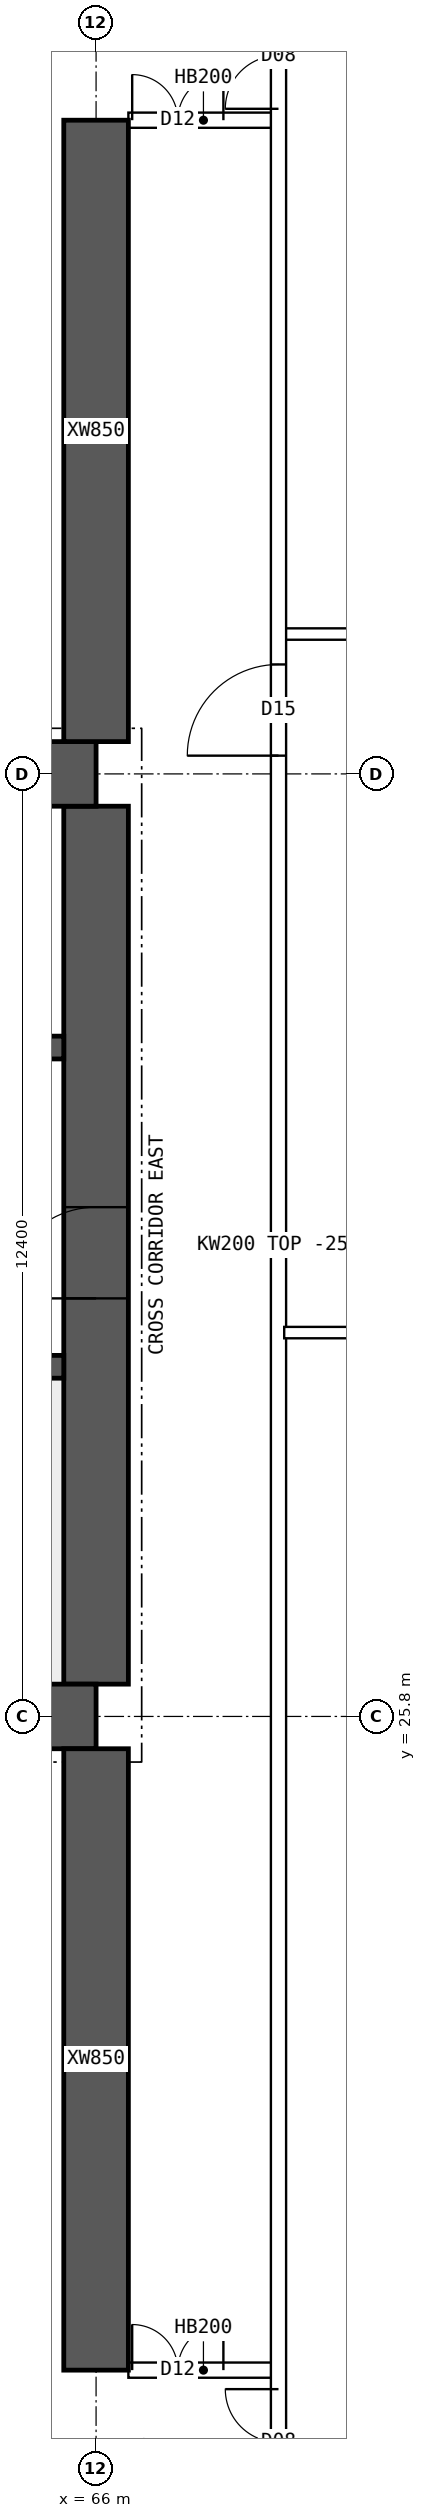
"""IFC4 building model, lengths in metres.
Left out: names, types, materials, properties, quantities, classifications, styles, units other than length and angle.
Written with IfcOpenShell. Run it as: python <this file> out.ifc"""

import sys

from ifc_helpers import new_model, si_unit, direction, frame, frame_2d, origin, place, context, subcontext, project, spatial, polyline, rectangle, outline, extrude, element, fill, save


model = new_model("IFC4")
c1 = context("Model", 3, precision=1e-05, world=origin(), true_north=direction((0.0, 1.0)))
c2 = subcontext(c1, "Body", "Model", "MODEL_VIEW")
j1 = project(units=[si_unit("LENGTHUNIT", "METRE"), si_unit("PLANEANGLEUNIT", "RADIAN")], contexts=[c1])
p1 = place(None, origin())
s1 = spatial("IfcSite", under=j1, at=p1, CompositionType="ELEMENT")
p2 = place(p1, origin())
s2 = spatial("IfcBuilding", under=s1, at=p2, CompositionType="ELEMENT")
p3 = place(p2, frame((0.0, 0.0, 152.35)))
s3 = spatial("IfcBuildingStorey", under=s2, at=p3, CompositionType="ELEMENT", Elevation=152.35)
for number, where, z_axis, x_axis in (
    (1, (18.0, 25.8, 0.0), (0.0, 0.0, 1.0), (1.0, 0.0, 0.0)),
    (2, (18.0, 38.2, 0.0), (0.0, 0.0, 1.0), (1.0, 0.0, 0.0)),
):
    element("IfcWall", number, at=place(p3, frame(where, z_axis=z_axis, x_axis=x_axis)), inside=s3, PredefinedType="SHEAR", context=c2, shape_type="SweptSolid", body=[
        extrude(rectangle(XDim=48.0, YDim=0.85, at=frame_2d((24.0, 0.0))), origin(), (0.0, 0.0, 1.0), 3.75),
    ])
p4 = place(p3, frame((66.0, 26.225, 0.0), z_axis=(0.0, 0.0, 1.0), x_axis=(0.0, 1.0, 0.0)))
e3 = element("IfcWall", 3, at=p4, inside=s3, PredefinedType="SHEAR", context=c2, shape_type="SweptSolid", body=[
    extrude(rectangle(XDim=11.55, YDim=0.85, at=frame_2d((5.775, 0.0))), origin(), (0.0, 0.0, 1.0), 3.75),
])
p5 = place(p4, frame((5.075, 0.0, 0.0)))
e4 = element("IfcOpeningElement", 4, at=p5, cuts=e3, PredefinedType="OPENING", context=c2, shape_type="SweptSolid", body=[
    extrude(rectangle(XDim=1.2, YDim=2.1, at=frame_2d((0.6, 1.05))), frame((0.0, 0.435, 0.0), z_axis=(0.0, -1.0, 0.0), x_axis=(1.0, 0.0, 0.0)), (0.0, 0.0, 1.0), 0.87),
])
p6 = place(p3, frame((18.425, 30.4, 0.0), z_axis=(0.0, 0.0, 1.0), x_axis=(1.0, 0.0, 0.0)))
e5 = element("IfcWall", 5, at=p6, inside=s3, PredefinedType="SHEAR", context=c2, shape_type="SweptSolid", body=[
    extrude(rectangle(XDim=47.15, YDim=0.3, at=frame_2d((23.575, 0.0))), origin(), (0.0, 0.0, 1.0), 3.75),
])
p7 = place(p6, frame((0.4, 0.0, 0.0)))
e6 = element("IfcOpeningElement", 6, at=p7, cuts=e5, PredefinedType="OPENING", context=c2, shape_type="SweptSolid", body=[
    extrude(rectangle(XDim=1.0, YDim=2.1, at=frame_2d((0.5, 1.05))), frame((0.0, 0.16, 0.0), z_axis=(0.0, -1.0, 0.0), x_axis=(1.0, 0.0, 0.0)), (0.0, 0.0, 1.0), 0.32),
])
p8 = place(p6, frame((45.75, 0.0, 0.0)))
e7 = element("IfcOpeningElement", 7, at=p8, cuts=e5, PredefinedType="OPENING", context=c2, shape_type="SweptSolid", body=[
    extrude(rectangle(XDim=1.0, YDim=2.1, at=frame_2d((0.5, 1.05))), frame((0.0, 0.16, 0.0), z_axis=(0.0, -1.0, 0.0), x_axis=(1.0, 0.0, 0.0)), (0.0, 0.0, 1.0), 0.32),
])
p9 = place(p6, frame((8.325, 0.0, 0.0)))
e8 = element("IfcOpeningElement", 8, at=p9, cuts=e5, PredefinedType="OPENING", context=c2, shape_type="SweptSolid", body=[
    extrude(rectangle(XDim=1.1, YDim=2.1, at=frame_2d((0.55, 1.05))), frame((0.0, 0.16, 0.0), z_axis=(0.0, -1.0, 0.0), x_axis=(1.0, 0.0, 0.0)), (0.0, 0.0, 1.0), 0.32),
])
p10 = place(p6, frame((10.925, 0.0, 0.0)))
e9 = element("IfcOpeningElement", 9, at=p10, cuts=e5, PredefinedType="OPENING", context=c2, shape_type="SweptSolid", body=[
    extrude(rectangle(XDim=1.1, YDim=2.1, at=frame_2d((0.55, 1.05))), frame((0.0, 0.16, 0.0), z_axis=(0.0, -1.0, 0.0), x_axis=(1.0, 0.0, 0.0)), (0.0, 0.0, 1.0), 0.32),
])
p11 = place(p6, frame((13.525, 0.0, 0.0)))
e10 = element("IfcOpeningElement", 10, at=p11, cuts=e5, PredefinedType="OPENING", context=c2, shape_type="SweptSolid", body=[
    extrude(rectangle(XDim=1.1, YDim=2.1, at=frame_2d((0.55, 1.05))), frame((0.0, 0.16, 0.0), z_axis=(0.0, -1.0, 0.0), x_axis=(1.0, 0.0, 0.0)), (0.0, 0.0, 1.0), 0.32),
])
p12 = place(p6, frame((16.125, 0.0, 0.0)))
e11 = element("IfcOpeningElement", 11, at=p12, cuts=e5, PredefinedType="OPENING", context=c2, shape_type="SweptSolid", body=[
    extrude(rectangle(XDim=1.1, YDim=2.1, at=frame_2d((0.55, 1.05))), frame((0.0, 0.16, 0.0), z_axis=(0.0, -1.0, 0.0), x_axis=(1.0, 0.0, 0.0)), (0.0, 0.0, 1.0), 0.32),
])
p13 = place(p6, frame((18.9, 0.0, 0.0)))
e12 = element("IfcOpeningElement", 12, at=p13, cuts=e5, PredefinedType="OPENING", context=c2, shape_type="SweptSolid", body=[
    extrude(rectangle(XDim=0.9, YDim=2.1, at=frame_2d((0.45, 1.05))), frame((0.0, 0.16, 0.0), z_axis=(0.0, -1.0, 0.0), x_axis=(1.0, 0.0, 0.0)), (0.0, 0.0, 1.0), 0.32),
])
p14 = place(p6, frame((30.192, 0.0, 0.0)))
e13 = element("IfcOpeningElement", 13, at=p14, cuts=e5, PredefinedType="OPENING", context=c2, shape_type="SweptSolid", body=[
    extrude(rectangle(XDim=1.1, YDim=2.1, at=frame_2d((0.55, 1.05))), frame((0.0, 0.16, 0.0), z_axis=(0.0, -1.0, 0.0), x_axis=(1.0, 0.0, 0.0)), (0.0, 0.0, 1.0), 0.32),
])
p15 = place(p6, frame((33.725, 0.0, 0.0)))
e14 = element("IfcOpeningElement", 14, at=p15, cuts=e5, PredefinedType="OPENING", context=c2, shape_type="SweptSolid", body=[
    extrude(rectangle(XDim=1.1, YDim=2.1, at=frame_2d((0.55, 1.05))), frame((0.0, 0.16, 0.0), z_axis=(0.0, -1.0, 0.0), x_axis=(1.0, 0.0, 0.0)), (0.0, 0.0, 1.0), 0.32),
])
p16 = place(p6, frame((37.258, 0.0, 0.0)))
e15 = element("IfcOpeningElement", 15, at=p16, cuts=e5, PredefinedType="OPENING", context=c2, shape_type="SweptSolid", body=[
    extrude(rectangle(XDim=1.1, YDim=2.1, at=frame_2d((0.55, 1.05))), frame((0.0, 0.16, 0.0), z_axis=(0.0, -1.0, 0.0), x_axis=(1.0, 0.0, 0.0)), (0.0, 0.0, 1.0), 0.32),
])
p17 = place(p3, frame((18.425, 34.6, 0.0), z_axis=(0.0, 0.0, 1.0), x_axis=(1.0, 0.0, 0.0)))
e16 = element("IfcWall", 16, at=p17, inside=s3, PredefinedType="SHEAR", context=c2, shape_type="SweptSolid", body=[
    extrude(rectangle(XDim=47.15, YDim=0.3, at=frame_2d((23.575, 0.0))), origin(), (0.0, 0.0, 1.0), 3.75),
])
p18 = place(p17, frame((0.9, 0.0, 0.0)))
e17 = element("IfcOpeningElement", 17, at=p18, cuts=e16, PredefinedType="OPENING", context=c2, shape_type="SweptSolid", body=[
    extrude(rectangle(XDim=1.1, YDim=2.1, at=frame_2d((0.55, 1.05))), frame((0.0, 0.16, 0.0), z_axis=(0.0, -1.0, 0.0), x_axis=(1.0, 0.0, 0.0)), (0.0, 0.0, 1.0), 0.32),
])
p19 = place(p17, frame((45.15, 0.0, 0.0)))
e18 = element("IfcOpeningElement", 18, at=p19, cuts=e16, PredefinedType="OPENING", context=c2, shape_type="SweptSolid", body=[
    extrude(rectangle(XDim=1.1, YDim=2.1, at=frame_2d((0.55, 1.05))), frame((0.0, 0.16, 0.0), z_axis=(0.0, -1.0, 0.0), x_axis=(1.0, 0.0, 0.0)), (0.0, 0.0, 1.0), 0.32),
])
p20 = place(p17, frame((4.175, 0.0, 0.0)))
e19 = element("IfcOpeningElement", 19, at=p20, cuts=e16, PredefinedType="OPENING", context=c2, shape_type="SweptSolid", body=[
    extrude(rectangle(XDim=0.9, YDim=2.1, at=frame_2d((0.45, 1.05))), frame((0.0, 0.16, 0.0), z_axis=(0.0, -1.0, 0.0), x_axis=(1.0, 0.0, 0.0)), (0.0, 0.0, 1.0), 0.32),
])
p21 = place(p17, frame((42.075, 0.0, 0.0)))
e20 = element("IfcOpeningElement", 20, at=p21, cuts=e16, PredefinedType="OPENING", context=c2, shape_type="SweptSolid", body=[
    extrude(rectangle(XDim=0.9, YDim=2.1, at=frame_2d((0.45, 1.05))), frame((0.0, 0.16, 0.0), z_axis=(0.0, -1.0, 0.0), x_axis=(1.0, 0.0, 0.0)), (0.0, 0.0, 1.0), 0.32),
])
p22 = place(p17, frame((8.95, 0.0, 0.0)))
e21 = element("IfcOpeningElement", 21, at=p22, cuts=e16, PredefinedType="OPENING", context=c2, shape_type="SweptSolid", body=[
    extrude(rectangle(XDim=0.9, YDim=2.1, at=frame_2d((0.45, 1.05))), frame((0.0, 0.16, 0.0), z_axis=(0.0, -1.0, 0.0), x_axis=(1.0, 0.0, 0.0)), (0.0, 0.0, 1.0), 0.32),
])
p23 = place(p17, frame((12.924, 0.0, 0.0)))
e22 = element("IfcOpeningElement", 22, at=p23, cuts=e16, PredefinedType="OPENING", context=c2, shape_type="SweptSolid", body=[
    extrude(rectangle(XDim=0.9, YDim=2.1, at=frame_2d((0.45, 1.05))), frame((0.0, 0.16, 0.0), z_axis=(0.0, -1.0, 0.0), x_axis=(1.0, 0.0, 0.0)), (0.0, 0.0, 1.0), 0.32),
])
p24 = place(p17, frame((16.571, 0.0, 0.0)))
e23 = element("IfcOpeningElement", 23, at=p24, cuts=e16, PredefinedType="OPENING", context=c2, shape_type="SweptSolid", body=[
    extrude(rectangle(XDim=0.9, YDim=2.1, at=frame_2d((0.45, 1.05))), frame((0.0, 0.16, 0.0), z_axis=(0.0, -1.0, 0.0), x_axis=(1.0, 0.0, 0.0)), (0.0, 0.0, 1.0), 0.32),
])
p25 = place(p17, frame((20.33, 0.0, 0.0)))
e24 = element("IfcOpeningElement", 24, at=p25, cuts=e16, PredefinedType="OPENING", context=c2, shape_type="SweptSolid", body=[
    extrude(rectangle(XDim=0.9, YDim=2.1, at=frame_2d((0.45, 1.05))), frame((0.0, 0.16, 0.0), z_axis=(0.0, -1.0, 0.0), x_axis=(1.0, 0.0, 0.0)), (0.0, 0.0, 1.0), 0.32),
])
p26 = place(p17, frame((24.736, 0.0, 0.0)))
e25 = element("IfcOpeningElement", 25, at=p26, cuts=e16, PredefinedType="OPENING", context=c2, shape_type="SweptSolid", body=[
    extrude(rectangle(XDim=0.9, YDim=2.1, at=frame_2d((0.45, 1.05))), frame((0.0, 0.16, 0.0), z_axis=(0.0, -1.0, 0.0), x_axis=(1.0, 0.0, 0.0)), (0.0, 0.0, 1.0), 0.32),
])
p27 = place(p17, frame((27.533, 0.0, 0.0)))
e26 = element("IfcOpeningElement", 26, at=p27, cuts=e16, PredefinedType="OPENING", context=c2, shape_type="SweptSolid", body=[
    extrude(rectangle(XDim=0.9, YDim=2.1, at=frame_2d((0.45, 1.05))), frame((0.0, 0.16, 0.0), z_axis=(0.0, -1.0, 0.0), x_axis=(1.0, 0.0, 0.0)), (0.0, 0.0, 1.0), 0.32),
])
p28 = place(p17, frame((29.703, 0.0, 0.0)))
e27 = element("IfcOpeningElement", 27, at=p28, cuts=e16, PredefinedType="OPENING", context=c2, shape_type="SweptSolid", body=[
    extrude(rectangle(XDim=0.9, YDim=2.1, at=frame_2d((0.45, 1.05))), frame((0.0, 0.16, 0.0), z_axis=(0.0, -1.0, 0.0), x_axis=(1.0, 0.0, 0.0)), (0.0, 0.0, 1.0), 0.32),
])
p29 = place(p17, frame((33.502, 0.0, 0.0)))
e28 = element("IfcOpeningElement", 28, at=p29, cuts=e16, PredefinedType="OPENING", context=c2, shape_type="SweptSolid", body=[
    extrude(rectangle(XDim=0.9, YDim=2.1, at=frame_2d((0.45, 1.05))), frame((0.0, 0.16, 0.0), z_axis=(0.0, -1.0, 0.0), x_axis=(1.0, 0.0, 0.0)), (0.0, 0.0, 1.0), 0.32),
])
p30 = place(p17, frame((37.453, 0.0, 0.0)))
e29 = element("IfcOpeningElement", 29, at=p30, cuts=e16, PredefinedType="OPENING", context=c2, shape_type="SweptSolid", body=[
    extrude(rectangle(XDim=0.9, YDim=2.1, at=frame_2d((0.45, 1.05))), frame((0.0, 0.16, 0.0), z_axis=(0.0, -1.0, 0.0), x_axis=(1.0, 0.0, 0.0)), (0.0, 0.0, 1.0), 0.32),
])
for number, where, z_axis, x_axis in (
    (30, (66.0, 17.2, 0.0), (0.0, 0.0, 1.0), (0.0, 1.0, 0.0)),
    (31, (66.0, 38.625, 0.0), (0.0, 0.0, 1.0), (0.0, 1.0, 0.0)),
):
    element("IfcWall", number, at=place(p3, frame(where, z_axis=z_axis, x_axis=x_axis)), inside=s3, PredefinedType="SHEAR", context=c2, shape_type="SweptSolid", body=[
        extrude(rectangle(XDim=8.175, YDim=0.85, at=frame_2d((4.087, 0.0))), origin(), (0.0, 0.0, 1.0), 3.75),
    ])
p31 = place(p3, frame((66.425, 17.2, 0.0), z_axis=(0.0, 0.0, 1.0), x_axis=(1.0, 0.0, 0.0)))
e32 = element("IfcWall", 32, at=p31, inside=s3, PredefinedType="SOLIDWALL", context=c2, shape_type="SweptSolid", body=[
    extrude(rectangle(XDim=1.975, YDim=0.2, at=frame_2d((0.987, 0.0))), origin(), (0.0, 0.0, 1.0), 3.5),
])
p32 = place(p31, frame((0.05, 0.0, 0.0)))
e33 = element("IfcOpeningElement", 33, at=p32, cuts=e32, PredefinedType="OPENING", context=c2, shape_type="SweptSolid", body=[
    extrude(rectangle(XDim=1.2, YDim=2.1, at=frame_2d((0.6, 1.05))), frame((0.0, 0.11, 0.0), z_axis=(0.0, -1.0, 0.0), x_axis=(1.0, 0.0, 0.0)), (0.0, 0.0, 1.0), 0.22),
])
p33 = place(p3, frame((66.425, 46.8, 0.0), z_axis=(0.0, 0.0, 1.0), x_axis=(1.0, 0.0, 0.0)))
e34 = element("IfcWall", 34, at=p33, inside=s3, PredefinedType="SOLIDWALL", context=c2, shape_type="SweptSolid", body=[
    extrude(rectangle(XDim=1.975, YDim=0.2, at=frame_2d((0.987, 0.0))), origin(), (0.0, 0.0, 1.0), 3.5),
])
p34 = place(p33, frame((0.05, 0.0, 0.0)))
e35 = element("IfcOpeningElement", 35, at=p34, cuts=e34, PredefinedType="OPENING", context=c2, shape_type="SweptSolid", body=[
    extrude(rectangle(XDim=1.2, YDim=2.1, at=frame_2d((0.6, 1.05))), frame((0.0, 0.11, 0.0), z_axis=(0.0, -1.0, 0.0), x_axis=(1.0, 0.0, 0.0)), (0.0, 0.0, 1.0), 0.22),
])
p35 = place(p3, frame((68.475, 30.85, 0.0), z_axis=(0.0, 0.0, 1.0), x_axis=(1.0, 0.0, 0.0)))
e36 = element("IfcWall", 36, at=p35, inside=s3, PredefinedType="PARTITIONING", context=c2, shape_type="SweptSolid", body=[
    extrude(outline(polyline([(0.0, 0.0), (6.82, 0.0), (6.82, 3.5), (3.827, 3.5), (3.825, 3.05), (3.227, 3.05), (3.225, 3.5), (0.0, 3.5), (0.0, 0.0)])), frame((0.0, 0.075, 0.0), z_axis=(0.0, -1.0, 0.0), x_axis=(1.0, 0.0, 0.0)), (0.0, 0.0, 1.0), 0.15),
])
p36 = place(p3, frame((68.4, 10.446, 0.0), z_axis=(0.0, 0.0, 1.0), x_axis=(0.0, 1.0, 0.0)))
e37 = element("IfcWall", 37, at=p36, inside=s3, PredefinedType="SOLIDWALL", context=c2, shape_type="SweptSolid", body=[
    extrude(rectangle(XDim=43.107, YDim=0.2, at=frame_2d((21.554, 0.0))), origin(), (0.0, 0.0, 1.0), 3.5),
])
p37 = place(p36, frame((27.994, 0.0, 0.0)))
e38 = element("IfcOpeningElement", 38, at=p37, cuts=e37, PredefinedType="OPENING", context=c2, shape_type="SweptSolid", body=[
    extrude(rectangle(XDim=1.2, YDim=2.1, at=frame_2d((0.6, 1.05))), frame((0.0, 0.11, 0.0), z_axis=(0.0, -1.0, 0.0), x_axis=(1.0, 0.0, 0.0)), (0.0, 0.0, 1.0), 0.22),
])
p38 = place(p36, frame((5.104, 0.0, 0.0)))
e39 = element("IfcOpeningElement", 39, at=p38, cuts=e37, PredefinedType="OPENING", context=c2, shape_type="SweptSolid", body=[
    extrude(rectangle(XDim=1.4, YDim=2.1, at=frame_2d((0.7, 1.05))), frame((0.0, 0.11, 0.0), z_axis=(0.0, -1.0, 0.0), x_axis=(1.0, 0.0, 0.0)), (0.0, 0.0, 1.0), 0.22),
])
p39 = place(p36, frame((36.504, 0.0, 0.0)))
e40 = element("IfcOpeningElement", 40, at=p39, cuts=e37, PredefinedType="OPENING", context=c2, shape_type="SweptSolid", body=[
    extrude(rectangle(XDim=1.4, YDim=2.1, at=frame_2d((0.7, 1.05))), frame((0.0, 0.11, 0.0), z_axis=(0.0, -1.0, 0.0), x_axis=(1.0, 0.0, 0.0)), (0.0, 0.0, 1.0), 0.22),
])
p40 = place(p3, frame((68.475, 40.04, 0.0), z_axis=(0.0, 0.0, 1.0), x_axis=(1.0, 0.0, 0.0)))
e41 = element("IfcWall", 41, at=p40, inside=s3, PredefinedType="PARTITIONING", context=c2, shape_type="SweptSolid", body=[
    extrude(rectangle(XDim=6.82, YDim=0.15, at=frame_2d((3.41, 0.0))), origin(), (0.0, 0.0, 1.0), 3.5),
])
p41 = place(p5, origin())
e42 = element("IfcDoor", 42, at=p41, inside=s3, OperationType="SINGLE_SWING_LEFT", PredefinedType="DOOR", context=c2, shape_type="SweptSolid", body=[
    extrude(rectangle(XDim=1.2, YDim=2.1, at=frame_2d((0.6, 1.05))), frame((0.0, 0.025, 0.0), z_axis=(0.0, -1.0, 0.0), x_axis=(1.0, 0.0, 0.0)), (0.0, 0.0, 1.0), 0.05),
])
fill(e4, e42)
p42 = place(p32, origin())
e43 = element("IfcDoor", 43, at=p42, inside=s3, OperationType="DOUBLE_DOOR_SINGLE_SWING", PredefinedType="DOOR", context=c2, shape_type="SweptSolid", body=[
    extrude(rectangle(XDim=1.2, YDim=2.1, at=frame_2d((0.6, 1.05))), frame((0.0, 0.025, 0.0), z_axis=(0.0, -1.0, 0.0), x_axis=(1.0, 0.0, 0.0)), (0.0, 0.0, 1.0), 0.05),
])
fill(e33, e43)
p43 = place(p34, origin())
e44 = element("IfcDoor", 44, at=p43, inside=s3, OperationType="DOUBLE_DOOR_SINGLE_SWING", PredefinedType="DOOR", context=c2, shape_type="SweptSolid", body=[
    extrude(rectangle(XDim=1.2, YDim=2.1, at=frame_2d((0.6, 1.05))), frame((0.0, 0.025, 0.0), z_axis=(0.0, -1.0, 0.0), x_axis=(1.0, 0.0, 0.0)), (0.0, 0.0, 1.0), 0.05),
])
fill(e35, e44)
p44 = place(p37, origin())
e45 = element("IfcDoor", 45, at=p44, inside=s3, OperationType="SINGLE_SWING_LEFT", PredefinedType="DOOR", context=c2, shape_type="SweptSolid", body=[
    extrude(rectangle(XDim=1.2, YDim=2.1, at=frame_2d((0.6, 1.05))), frame((0.0, 0.025, 0.0), z_axis=(0.0, -1.0, 0.0), x_axis=(1.0, 0.0, 0.0)), (0.0, 0.0, 1.0), 0.05),
])
fill(e38, e45)
p45 = place(p38, origin())
e46 = element("IfcDoor", 46, at=p45, inside=s3, OperationType="DOUBLE_DOOR_SINGLE_SWING", PredefinedType="DOOR", context=c2, shape_type="SweptSolid", body=[
    extrude(rectangle(XDim=1.4, YDim=2.1, at=frame_2d((0.7, 1.05))), frame((0.0, 0.025, 0.0), z_axis=(0.0, -1.0, 0.0), x_axis=(1.0, 0.0, 0.0)), (0.0, 0.0, 1.0), 0.05),
])
fill(e39, e46)
p46 = place(p39, origin())
e47 = element("IfcDoor", 47, at=p46, inside=s3, OperationType="DOUBLE_DOOR_SINGLE_SWING", PredefinedType="DOOR", context=c2, shape_type="SweptSolid", body=[
    extrude(rectangle(XDim=1.4, YDim=2.1, at=frame_2d((0.7, 1.05))), frame((0.0, 0.025, 0.0), z_axis=(0.0, -1.0, 0.0), x_axis=(1.0, 0.0, 0.0)), (0.0, 0.0, 1.0), 0.05),
])
fill(e40, e47)
save(model, sys.argv[1])
